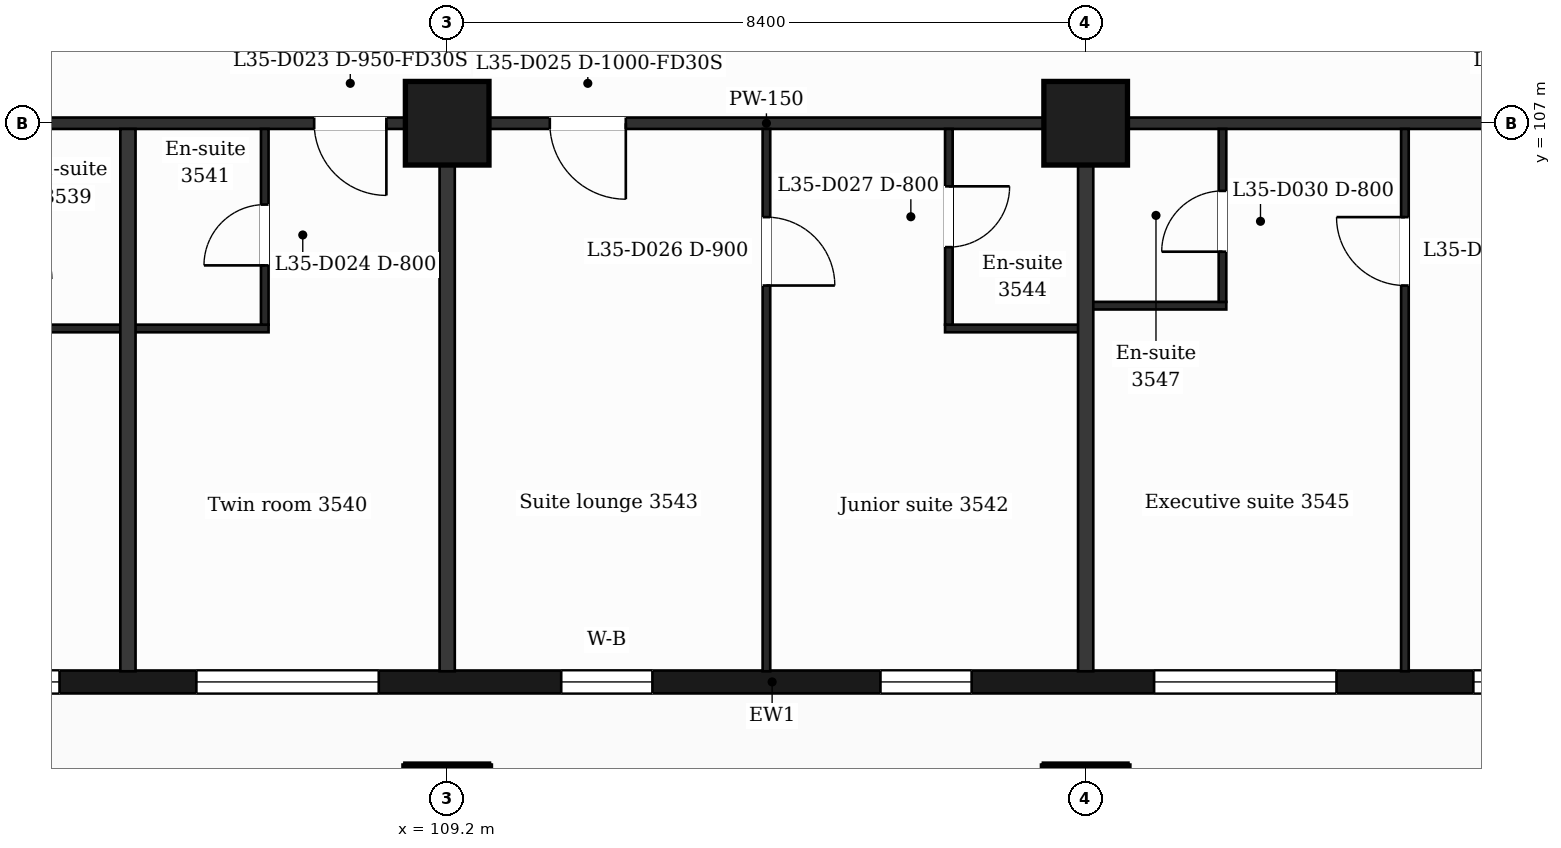
"""IFC4 building model, lengths in metres.
Left out: names, types, materials, properties, quantities, classifications, styles, units other than length and angle.
Written with IfcOpenShell. Run it as: python <this file> out.ifc"""

import sys

from ifc_helpers import new_model, si_unit, direction, frame, frame_2d, origin, origin_2d, place, context, subcontext, project, spatial, rectangle, extrude, element, fill, save


model = new_model("IFC4")
c1 = context("Model", 3, precision=1e-05, world=origin(), true_north=direction((0.0, 1.0)))
c2 = subcontext(c1, "Body", "Model", "MODEL_VIEW")
j1 = project(units=[si_unit("LENGTHUNIT", "METRE"), si_unit("PLANEANGLEUNIT", "RADIAN")], contexts=[c1])
p1 = place(None, origin())
s1 = spatial("IfcSite", under=j1, at=p1, CompositionType="ELEMENT")
p2 = place(p1, origin())
s2 = spatial("IfcBuilding", under=s1, at=p2, CompositionType="ELEMENT")
p3 = place(p2, frame((0.0, 0.0, 151.5)))
s3 = spatial("IfcBuildingStorey", under=s2, at=p3, CompositionType="ELEMENT", Elevation=151.5)
for number, where, z_axis, x_axis in (
    (1, (109.2, 98.0, 0.0), (0.0, 0.0, 1.0), (1.0, 0.0, 0.0)),
    (2, (117.6, 98.0, 0.0), (0.0, 0.0, 1.0), (1.0, 0.0, 0.0)),
    (3, (109.2, 107.0, 0.0), (0.0, 0.0, 1.0), (1.0, 0.0, 0.0)),
    (4, (117.6, 107.0, 0.0), (0.0, 0.0, 1.0), (1.0, 0.0, 0.0)),
):
    element("IfcColumn", number, at=place(p3, frame(where, z_axis=z_axis, x_axis=x_axis)), inside=s3, PredefinedType="COLUMN", context=c2, shape_type="SweptSolid", body=[
        extrude(rectangle(XDim=1.1, YDim=1.1, at=origin_2d()), origin(), (0.0, 0.0, 1.0), 3.7),
    ])
p4 = place(p3, frame((89.85, 99.65, 0.0), z_axis=(0.0, 0.0, 1.0), x_axis=(1.0, 0.0, 0.0)))
e5 = element("IfcWall", 5, at=p4, inside=s3, PredefinedType="SOLIDWALL", context=c2, shape_type="SweptSolid", body=[
    extrude(rectangle(XDim=47.25, YDim=0.3, at=frame_2d((23.625, 0.0))), origin(), (0.0, 0.0, 1.0), 3.38),
])
p5 = place(p4, frame((0.725, 0.0, 0.9)))
e6 = element("IfcOpeningElement", 6, at=p5, cuts=e5, PredefinedType="OPENING", context=c2, shape_type="SweptSolid", body=[
    extrude(rectangle(XDim=1.2, YDim=2.1, at=frame_2d((0.6, 1.05))), frame((0.0, 0.16, 0.0), z_axis=(0.0, -1.0, 0.0), x_axis=(1.0, 0.0, 0.0)), (0.0, 0.0, 1.0), 0.32),
])
p6 = place(p4, frame((3.45, 0.0, 0.9)))
e7 = element("IfcOpeningElement", 7, at=p6, cuts=e5, PredefinedType="OPENING", context=c2, shape_type="SweptSolid", body=[
    extrude(rectangle(XDim=2.4, YDim=2.1, at=frame_2d((1.2, 1.05))), frame((0.0, 0.16, 0.0), z_axis=(0.0, -1.0, 0.0), x_axis=(1.0, 0.0, 0.0)), (0.0, 0.0, 1.0), 0.32),
])
p7 = place(p4, frame((7.35, 0.0, 0.0)))
e8 = element("IfcOpeningElement", 8, at=p7, cuts=e5, PredefinedType="OPENING", context=c2, shape_type="SweptSolid", body=[
    extrude(rectangle(XDim=1.2, YDim=2.4, at=frame_2d((0.6, 1.2))), frame((0.0, 0.16, 0.0), z_axis=(0.0, -1.0, 0.0), x_axis=(1.0, 0.0, 0.0)), (0.0, 0.0, 1.0), 0.32),
])
p8 = place(p4, frame((9.15, 0.0, 0.9)))
e9 = element("IfcOpeningElement", 9, at=p8, cuts=e5, PredefinedType="OPENING", context=c2, shape_type="SweptSolid", body=[
    extrude(rectangle(XDim=1.2, YDim=2.1, at=frame_2d((0.6, 1.05))), frame((0.0, 0.16, 0.0), z_axis=(0.0, -1.0, 0.0), x_axis=(1.0, 0.0, 0.0)), (0.0, 0.0, 1.0), 0.32),
])
p9 = place(p4, frame((11.85, 0.0, 0.9)))
e10 = element("IfcOpeningElement", 10, at=p9, cuts=e5, PredefinedType="OPENING", context=c2, shape_type="SweptSolid", body=[
    extrude(rectangle(XDim=2.4, YDim=2.1, at=frame_2d((1.2, 1.05))), frame((0.0, 0.16, 0.0), z_axis=(0.0, -1.0, 0.0), x_axis=(1.0, 0.0, 0.0)), (0.0, 0.0, 1.0), 0.32),
])
p10 = place(p4, frame((16.05, 0.0, 0.9)))
e11 = element("IfcOpeningElement", 11, at=p10, cuts=e5, PredefinedType="OPENING", context=c2, shape_type="SweptSolid", body=[
    extrude(rectangle(XDim=2.4, YDim=2.1, at=frame_2d((1.2, 1.05))), frame((0.0, 0.16, 0.0), z_axis=(0.0, -1.0, 0.0), x_axis=(1.0, 0.0, 0.0)), (0.0, 0.0, 1.0), 0.32),
])
p11 = place(p4, frame((20.85, 0.0, 0.9)))
e12 = element("IfcOpeningElement", 12, at=p11, cuts=e5, PredefinedType="OPENING", context=c2, shape_type="SweptSolid", body=[
    extrude(rectangle(XDim=1.2, YDim=2.1, at=frame_2d((0.6, 1.05))), frame((0.0, 0.16, 0.0), z_axis=(0.0, -1.0, 0.0), x_axis=(1.0, 0.0, 0.0)), (0.0, 0.0, 1.0), 0.32),
])
p12 = place(p4, frame((25.05, 0.0, 0.9)))
e13 = element("IfcOpeningElement", 13, at=p12, cuts=e5, PredefinedType="OPENING", context=c2, shape_type="SweptSolid", body=[
    extrude(rectangle(XDim=1.2, YDim=2.1, at=frame_2d((0.6, 1.05))), frame((0.0, 0.16, 0.0), z_axis=(0.0, -1.0, 0.0), x_axis=(1.0, 0.0, 0.0)), (0.0, 0.0, 1.0), 0.32),
])
p13 = place(p4, frame((28.65, 0.0, 0.9)))
e14 = element("IfcOpeningElement", 14, at=p13, cuts=e5, PredefinedType="OPENING", context=c2, shape_type="SweptSolid", body=[
    extrude(rectangle(XDim=2.4, YDim=2.1, at=frame_2d((1.2, 1.05))), frame((0.0, 0.16, 0.0), z_axis=(0.0, -1.0, 0.0), x_axis=(1.0, 0.0, 0.0)), (0.0, 0.0, 1.0), 0.32),
])
p14 = place(p4, frame((32.85, 0.0, 0.9)))
e15 = element("IfcOpeningElement", 15, at=p14, cuts=e5, PredefinedType="OPENING", context=c2, shape_type="SweptSolid", body=[
    extrude(rectangle(XDim=2.4, YDim=2.1, at=frame_2d((1.2, 1.05))), frame((0.0, 0.16, 0.0), z_axis=(0.0, -1.0, 0.0), x_axis=(1.0, 0.0, 0.0)), (0.0, 0.0, 1.0), 0.32),
])
p15 = place(p4, frame((37.05, 0.0, 0.9)))
e16 = element("IfcOpeningElement", 16, at=p15, cuts=e5, PredefinedType="OPENING", context=c2, shape_type="SweptSolid", body=[
    extrude(rectangle(XDim=2.4, YDim=2.1, at=frame_2d((1.2, 1.05))), frame((0.0, 0.16, 0.0), z_axis=(0.0, -1.0, 0.0), x_axis=(1.0, 0.0, 0.0)), (0.0, 0.0, 1.0), 0.32),
])
p16 = place(p4, frame((41.25, 0.0, 0.9)))
e17 = element("IfcOpeningElement", 17, at=p16, cuts=e5, PredefinedType="OPENING", context=c2, shape_type="SweptSolid", body=[
    extrude(rectangle(XDim=2.4, YDim=2.1, at=frame_2d((1.2, 1.05))), frame((0.0, 0.16, 0.0), z_axis=(0.0, -1.0, 0.0), x_axis=(1.0, 0.0, 0.0)), (0.0, 0.0, 1.0), 0.32),
])
p17 = place(p4, frame((45.25, 0.0, 0.9)))
e18 = element("IfcOpeningElement", 18, at=p17, cuts=e5, PredefinedType="OPENING", context=c2, shape_type="SweptSolid", body=[
    extrude(rectangle(XDim=1.2, YDim=2.1, at=frame_2d((0.6, 1.05))), frame((0.0, 0.16, 0.0), z_axis=(0.0, -1.0, 0.0), x_axis=(1.0, 0.0, 0.0)), (0.0, 0.0, 1.0), 0.32),
])
p18 = place(p3, frame((103.15, 104.3, 0.0), z_axis=(0.0, 0.0, 1.0), x_axis=(1.0, 0.0, 0.0)))
e19 = element("IfcWall", 19, at=p18, inside=s3, PredefinedType="PARTITIONING", context=c2, shape_type="SweptSolid", body=[
    extrude(rectangle(XDim=3.7, YDim=0.1, at=frame_2d((1.85, 0.0))), origin(), (0.0, 0.0, 1.0), 3.38),
])
p19 = place(p3, frame((115.75, 104.3, 0.0), z_axis=(0.0, 0.0, 1.0), x_axis=(1.0, 0.0, 0.0)))
e20 = element("IfcWall", 20, at=p19, inside=s3, PredefinedType="PARTITIONING", context=c2, shape_type="SweptSolid", body=[
    extrude(rectangle(XDim=1.85, YDim=0.1, at=frame_2d((0.925, 0.0))), origin(), (0.0, 0.0, 1.0), 3.38),
])
p20 = place(p3, frame((117.6, 104.6, 0.0), z_axis=(0.0, 0.0, 1.0), x_axis=(1.0, 0.0, 0.0)))
e21 = element("IfcWall", 21, at=p20, inside=s3, PredefinedType="PARTITIONING", context=c2, shape_type="SweptSolid", body=[
    extrude(rectangle(XDim=1.85, YDim=0.1, at=frame_2d((0.925, 0.0))), origin(), (0.0, 0.0, 1.0), 3.38),
])
p21 = place(p3, frame((87.018, 107.0, 0.0), z_axis=(0.0, 0.0, 1.0), x_axis=(1.0, 0.0, 0.0)))
e22 = element("IfcWall", 22, at=p21, inside=s3, PredefinedType="PARTITIONING", context=c2, shape_type="SweptSolid", body=[
    extrude(rectangle(XDim=52.765, YDim=0.15, at=frame_2d((26.382, 0.0))), origin(), (0.0, 0.0, 1.0), 3.38),
])
p22 = place(p21, frame((0.707, 0.0, 0.0)))
e23 = element("IfcOpeningElement", 23, at=p22, cuts=e22, PredefinedType="OPENING", context=c2, shape_type="SweptSolid", body=[
    extrude(rectangle(XDim=0.95, YDim=2.1, at=frame_2d((0.475, 1.05))), frame((0.0, 0.085, 0.0), z_axis=(0.0, -1.0, 0.0), x_axis=(1.0, 0.0, 0.0)), (0.0, 0.0, 1.0), 0.17),
])
p23 = place(p21, frame((7.645, 0.0, 0.0)))
e24 = element("IfcOpeningElement", 24, at=p23, cuts=e22, PredefinedType="OPENING", context=c2, shape_type="SweptSolid", body=[
    extrude(rectangle(XDim=0.95, YDim=2.1, at=frame_2d((0.475, 1.05))), frame((0.0, 0.085, 0.0), z_axis=(0.0, -1.0, 0.0), x_axis=(1.0, 0.0, 0.0)), (0.0, 0.0, 1.0), 0.17),
])
p24 = place(p21, frame((12.067, 0.0, 0.0)))
e25 = element("IfcOpeningElement", 25, at=p24, cuts=e22, PredefinedType="OPENING", context=c2, shape_type="SweptSolid", body=[
    extrude(rectangle(XDim=0.95, YDim=2.1, at=frame_2d((0.475, 1.05))), frame((0.0, 0.085, 0.0), z_axis=(0.0, -1.0, 0.0), x_axis=(1.0, 0.0, 0.0)), (0.0, 0.0, 1.0), 0.17),
])
p25 = place(p21, frame((14.582, 0.0, 0.0)))
e26 = element("IfcOpeningElement", 26, at=p25, cuts=e22, PredefinedType="OPENING", context=c2, shape_type="SweptSolid", body=[
    extrude(rectangle(XDim=0.95, YDim=2.1, at=frame_2d((0.475, 1.05))), frame((0.0, 0.085, 0.0), z_axis=(0.0, -1.0, 0.0), x_axis=(1.0, 0.0, 0.0)), (0.0, 0.0, 1.0), 0.17),
])
p26 = place(p21, frame((20.432, 0.0, 0.0)))
e27 = element("IfcOpeningElement", 27, at=p26, cuts=e22, PredefinedType="OPENING", context=c2, shape_type="SweptSolid", body=[
    extrude(rectangle(XDim=0.95, YDim=2.1, at=frame_2d((0.475, 1.05))), frame((0.0, 0.085, 0.0), z_axis=(0.0, -1.0, 0.0), x_axis=(1.0, 0.0, 0.0)), (0.0, 0.0, 1.0), 0.17),
])
p27 = place(p21, frame((23.532, 0.0, 0.0)))
e28 = element("IfcOpeningElement", 28, at=p27, cuts=e22, PredefinedType="OPENING", context=c2, shape_type="SweptSolid", body=[
    extrude(rectangle(XDim=1.0, YDim=2.1, at=frame_2d((0.5, 1.05))), frame((0.0, 0.085, 0.0), z_axis=(0.0, -1.0, 0.0), x_axis=(1.0, 0.0, 0.0)), (0.0, 0.0, 1.0), 0.17),
])
p28 = place(p21, frame((36.807, 0.0, 0.0)))
e29 = element("IfcOpeningElement", 29, at=p28, cuts=e22, PredefinedType="OPENING", context=c2, shape_type="SweptSolid", body=[
    extrude(rectangle(XDim=1.0, YDim=2.1, at=frame_2d((0.5, 1.05))), frame((0.0, 0.085, 0.0), z_axis=(0.0, -1.0, 0.0), x_axis=(1.0, 0.0, 0.0)), (0.0, 0.0, 1.0), 0.17),
])
p29 = place(p21, frame((43.457, 0.0, 0.0)))
e30 = element("IfcOpeningElement", 30, at=p29, cuts=e22, PredefinedType="OPENING", context=c2, shape_type="SweptSolid", body=[
    extrude(rectangle(XDim=0.95, YDim=2.1, at=frame_2d((0.475, 1.05))), frame((0.0, 0.085, 0.0), z_axis=(0.0, -1.0, 0.0), x_axis=(1.0, 0.0, 0.0)), (0.0, 0.0, 1.0), 0.17),
])
p30 = place(p21, frame((48.974, 0.0, 0.0)))
e31 = element("IfcOpeningElement", 31, at=p30, cuts=e22, PredefinedType="OPENING", context=c2, shape_type="SweptSolid", body=[
    extrude(rectangle(XDim=0.95, YDim=2.1, at=frame_2d((0.475, 1.05))), frame((0.0, 0.085, 0.0), z_axis=(0.0, -1.0, 0.0), x_axis=(1.0, 0.0, 0.0)), (0.0, 0.0, 1.0), 0.17),
])
p31 = place(p3, frame((105.0, 99.79, 0.0), z_axis=(0.0, 0.0, 1.0), x_axis=(0.0, 1.0, 0.0)))
e32 = element("IfcWall", 32, at=p31, inside=s3, PredefinedType="PARTITIONING", context=c2, shape_type="SweptSolid", body=[
    extrude(rectangle(XDim=7.135, YDim=0.2, at=frame_2d((3.567, 0.0))), origin(), (0.0, 0.0, 1.0), 3.38),
])
p32 = place(p3, frame((106.8, 104.35, 0.0), z_axis=(0.0, 0.0, 1.0), x_axis=(0.0, 1.0, 0.0)))
e33 = element("IfcWall", 33, at=p32, inside=s3, PredefinedType="PARTITIONING", context=c2, shape_type="SweptSolid", body=[
    extrude(rectangle(XDim=2.575, YDim=0.1, at=frame_2d((1.288, 0.0))), origin(), (0.0, 0.0, 1.0), 3.38),
])
p33 = place(p32, frame((0.78, 0.0, 0.0)))
e34 = element("IfcOpeningElement", 34, at=p33, cuts=e33, PredefinedType="OPENING", context=c2, shape_type="SweptSolid", body=[
    extrude(rectangle(XDim=0.8, YDim=2.1, at=frame_2d((0.4, 1.05))), frame((0.0, 0.06, 0.0), z_axis=(0.0, -1.0, 0.0), x_axis=(1.0, 0.0, 0.0)), (0.0, 0.0, 1.0), 0.12),
])
p34 = place(p3, frame((109.2, 99.79, 0.0), z_axis=(0.0, 0.0, 1.0), x_axis=(0.0, 1.0, 0.0)))
e35 = element("IfcWall", 35, at=p34, inside=s3, PredefinedType="PARTITIONING", context=c2, shape_type="SweptSolid", body=[
    extrude(rectangle(XDim=7.135, YDim=0.2, at=frame_2d((3.567, 0.0))), origin(), (0.0, 0.0, 1.0), 3.38),
])
p35 = place(p3, frame((113.4, 99.79, 0.0), z_axis=(0.0, 0.0, 1.0), x_axis=(0.0, 1.0, 0.0)))
e36 = element("IfcWall", 36, at=p35, inside=s3, PredefinedType="PARTITIONING", context=c2, shape_type="SweptSolid", body=[
    extrude(rectangle(XDim=7.135, YDim=0.1, at=frame_2d((3.567, 0.0))), origin(), (0.0, 0.0, 1.0), 3.38),
])
p36 = place(p35, frame((5.075, 0.0, 0.0)))
e37 = element("IfcOpeningElement", 37, at=p36, cuts=e36, PredefinedType="OPENING", context=c2, shape_type="SweptSolid", body=[
    extrude(rectangle(XDim=0.9, YDim=2.1, at=frame_2d((0.45, 1.05))), frame((0.0, 0.06, 0.0), z_axis=(0.0, -1.0, 0.0), x_axis=(1.0, 0.0, 0.0)), (0.0, 0.0, 1.0), 0.12),
])
p37 = place(p3, frame((115.8, 104.35, 0.0), z_axis=(0.0, 0.0, 1.0), x_axis=(0.0, 1.0, 0.0)))
e38 = element("IfcWall", 38, at=p37, inside=s3, PredefinedType="PARTITIONING", context=c2, shape_type="SweptSolid", body=[
    extrude(rectangle(XDim=2.575, YDim=0.1, at=frame_2d((1.288, 0.0))), origin(), (0.0, 0.0, 1.0), 3.38),
])
p38 = place(p37, frame((1.02, 0.0, 0.0)))
e39 = element("IfcOpeningElement", 39, at=p38, cuts=e38, PredefinedType="OPENING", context=c2, shape_type="SweptSolid", body=[
    extrude(rectangle(XDim=0.8, YDim=2.1, at=frame_2d((0.4, 1.05))), frame((0.0, 0.06, 0.0), z_axis=(0.0, -1.0, 0.0), x_axis=(1.0, 0.0, 0.0)), (0.0, 0.0, 1.0), 0.12),
])
p39 = place(p3, frame((117.6, 99.79, 0.0), z_axis=(0.0, 0.0, 1.0), x_axis=(0.0, 1.0, 0.0)))
e40 = element("IfcWall", 40, at=p39, inside=s3, PredefinedType="PARTITIONING", context=c2, shape_type="SweptSolid", body=[
    extrude(rectangle(XDim=7.135, YDim=0.2, at=frame_2d((3.567, 0.0))), origin(), (0.0, 0.0, 1.0), 3.38),
])
p40 = place(p3, frame((119.4, 104.65, 0.0), z_axis=(0.0, 0.0, 1.0), x_axis=(0.0, 1.0, 0.0)))
e41 = element("IfcWall", 41, at=p40, inside=s3, PredefinedType="PARTITIONING", context=c2, shape_type="SweptSolid", body=[
    extrude(rectangle(XDim=2.275, YDim=0.1, at=frame_2d((1.138, 0.0))), origin(), (0.0, 0.0, 1.0), 3.38),
])
p41 = place(p40, frame((0.66, 0.0, 0.0)))
e42 = element("IfcOpeningElement", 42, at=p41, cuts=e41, PredefinedType="OPENING", context=c2, shape_type="SweptSolid", body=[
    extrude(rectangle(XDim=0.8, YDim=2.1, at=frame_2d((0.4, 1.05))), frame((0.0, 0.06, 0.0), z_axis=(0.0, -1.0, 0.0), x_axis=(1.0, 0.0, 0.0)), (0.0, 0.0, 1.0), 0.12),
])
p42 = place(p3, frame((121.8, 99.79, 0.0), z_axis=(0.0, 0.0, 1.0), x_axis=(0.0, 1.0, 0.0)))
e43 = element("IfcWall", 43, at=p42, inside=s3, PredefinedType="PARTITIONING", context=c2, shape_type="SweptSolid", body=[
    extrude(rectangle(XDim=7.135, YDim=0.1, at=frame_2d((3.567, 0.0))), origin(), (0.0, 0.0, 1.0), 3.38),
])
p43 = place(p42, frame((5.075, 0.0, 0.0)))
e44 = element("IfcOpeningElement", 44, at=p43, cuts=e43, PredefinedType="OPENING", context=c2, shape_type="SweptSolid", body=[
    extrude(rectangle(XDim=0.9, YDim=2.1, at=frame_2d((0.45, 1.05))), frame((0.0, 0.06, 0.0), z_axis=(0.0, -1.0, 0.0), x_axis=(1.0, 0.0, 0.0)), (0.0, 0.0, 1.0), 0.12),
])
p44 = place(p9, origin())
e45 = element("IfcWindow", 45, at=p44, inside=s3, PartitioningType="SINGLE_PANEL", PredefinedType="WINDOW", context=c2, shape_type="SweptSolid", body=[
    extrude(rectangle(XDim=2.4, YDim=2.1, at=frame_2d((1.2, 1.05))), frame((0.0, 0.03, 0.0), z_axis=(0.0, -1.0, 0.0), x_axis=(1.0, 0.0, 0.0)), (0.0, 0.0, 1.0), 0.06),
])
fill(e10, e45)
p45 = place(p10, origin())
e46 = element("IfcWindow", 46, at=p45, inside=s3, PartitioningType="SINGLE_PANEL", PredefinedType="WINDOW", context=c2, shape_type="SweptSolid", body=[
    extrude(rectangle(XDim=2.4, YDim=2.1, at=frame_2d((1.2, 1.05))), frame((0.0, 0.03, 0.0), z_axis=(0.0, -1.0, 0.0), x_axis=(1.0, 0.0, 0.0)), (0.0, 0.0, 1.0), 0.06),
])
fill(e11, e46)
p46 = place(p11, origin())
e47 = element("IfcWindow", 47, at=p46, inside=s3, PartitioningType="SINGLE_PANEL", PredefinedType="WINDOW", context=c2, shape_type="SweptSolid", body=[
    extrude(rectangle(XDim=1.2, YDim=2.1, at=frame_2d((0.6, 1.05))), frame((0.0, 0.03, 0.0), z_axis=(0.0, -1.0, 0.0), x_axis=(1.0, 0.0, 0.0)), (0.0, 0.0, 1.0), 0.06),
])
fill(e12, e47)
p47 = place(p12, origin())
e48 = element("IfcWindow", 48, at=p47, inside=s3, PartitioningType="SINGLE_PANEL", PredefinedType="WINDOW", context=c2, shape_type="SweptSolid", body=[
    extrude(rectangle(XDim=1.2, YDim=2.1, at=frame_2d((0.6, 1.05))), frame((0.0, 0.03, 0.0), z_axis=(0.0, -1.0, 0.0), x_axis=(1.0, 0.0, 0.0)), (0.0, 0.0, 1.0), 0.06),
])
fill(e13, e48)
p48 = place(p13, origin())
e49 = element("IfcWindow", 49, at=p48, inside=s3, PartitioningType="SINGLE_PANEL", PredefinedType="WINDOW", context=c2, shape_type="SweptSolid", body=[
    extrude(rectangle(XDim=2.4, YDim=2.1, at=frame_2d((1.2, 1.05))), frame((0.0, 0.03, 0.0), z_axis=(0.0, -1.0, 0.0), x_axis=(1.0, 0.0, 0.0)), (0.0, 0.0, 1.0), 0.06),
])
fill(e14, e49)
p49 = place(p14, origin())
e50 = element("IfcWindow", 50, at=p49, inside=s3, PartitioningType="SINGLE_PANEL", PredefinedType="WINDOW", context=c2, shape_type="SweptSolid", body=[
    extrude(rectangle(XDim=2.4, YDim=2.1, at=frame_2d((1.2, 1.05))), frame((0.0, 0.03, 0.0), z_axis=(0.0, -1.0, 0.0), x_axis=(1.0, 0.0, 0.0)), (0.0, 0.0, 1.0), 0.06),
])
fill(e15, e50)
p50 = place(p26, origin())
e51 = element("IfcDoor", 51, at=p50, inside=s3, OperationType="SINGLE_SWING_RIGHT", PredefinedType="DOOR", context=c2, shape_type="SweptSolid", body=[
    extrude(rectangle(XDim=0.95, YDim=2.1, at=frame_2d((0.475, 1.05))), frame((0.0, 0.025, 0.0), z_axis=(0.0, -1.0, 0.0), x_axis=(1.0, 0.0, 0.0)), (0.0, 0.0, 1.0), 0.05),
])
fill(e27, e51)
p51 = place(p33, origin())
e52 = element("IfcDoor", 52, at=p51, inside=s3, OperationType="SINGLE_SWING_LEFT", PredefinedType="DOOR", context=c2, shape_type="SweptSolid", body=[
    extrude(rectangle(XDim=0.8, YDim=2.1, at=frame_2d((0.4, 1.05))), frame((0.0, 0.025, 0.0), z_axis=(0.0, -1.0, 0.0), x_axis=(1.0, 0.0, 0.0)), (0.0, 0.0, 1.0), 0.05),
])
fill(e34, e52)
p52 = place(p27, origin())
e53 = element("IfcDoor", 53, at=p52, inside=s3, OperationType="SINGLE_SWING_RIGHT", PredefinedType="DOOR", context=c2, shape_type="SweptSolid", body=[
    extrude(rectangle(XDim=1.0, YDim=2.1, at=frame_2d((0.5, 1.05))), frame((0.0, 0.025, 0.0), z_axis=(0.0, -1.0, 0.0), x_axis=(1.0, 0.0, 0.0)), (0.0, 0.0, 1.0), 0.05),
])
fill(e28, e53)
p53 = place(p36, origin())
e54 = element("IfcDoor", 54, at=p53, inside=s3, OperationType="SINGLE_SWING_LEFT", PredefinedType="DOOR", context=c2, shape_type="SweptSolid", body=[
    extrude(rectangle(XDim=0.9, YDim=2.1, at=frame_2d((0.45, 1.05))), frame((0.0, 0.025, 0.0), z_axis=(0.0, -1.0, 0.0), x_axis=(1.0, 0.0, 0.0)), (0.0, 0.0, 1.0), 0.05),
])
fill(e37, e54)
p54 = place(p38, origin())
e55 = element("IfcDoor", 55, at=p54, inside=s3, OperationType="SINGLE_SWING_RIGHT", PredefinedType="DOOR", context=c2, shape_type="SweptSolid", body=[
    extrude(rectangle(XDim=0.8, YDim=2.1, at=frame_2d((0.4, 1.05))), frame((0.0, 0.025, 0.0), z_axis=(0.0, -1.0, 0.0), x_axis=(1.0, 0.0, 0.0)), (0.0, 0.0, 1.0), 0.05),
])
fill(e39, e55)
p55 = place(p43, origin())
e56 = element("IfcDoor", 56, at=p55, inside=s3, OperationType="SINGLE_SWING_RIGHT", PredefinedType="DOOR", context=c2, shape_type="SweptSolid", body=[
    extrude(rectangle(XDim=0.9, YDim=2.1, at=frame_2d((0.45, 1.05))), frame((0.0, 0.025, 0.0), z_axis=(0.0, -1.0, 0.0), x_axis=(1.0, 0.0, 0.0)), (0.0, 0.0, 1.0), 0.05),
])
fill(e44, e56)
p56 = place(p41, origin())
e57 = element("IfcDoor", 57, at=p56, inside=s3, OperationType="SINGLE_SWING_LEFT", PredefinedType="DOOR", context=c2, shape_type="SweptSolid", body=[
    extrude(rectangle(XDim=0.8, YDim=2.1, at=frame_2d((0.4, 1.05))), frame((0.0, 0.025, 0.0), z_axis=(0.0, -1.0, 0.0), x_axis=(1.0, 0.0, 0.0)), (0.0, 0.0, 1.0), 0.05),
])
fill(e42, e57)
save(model, sys.argv[1])
